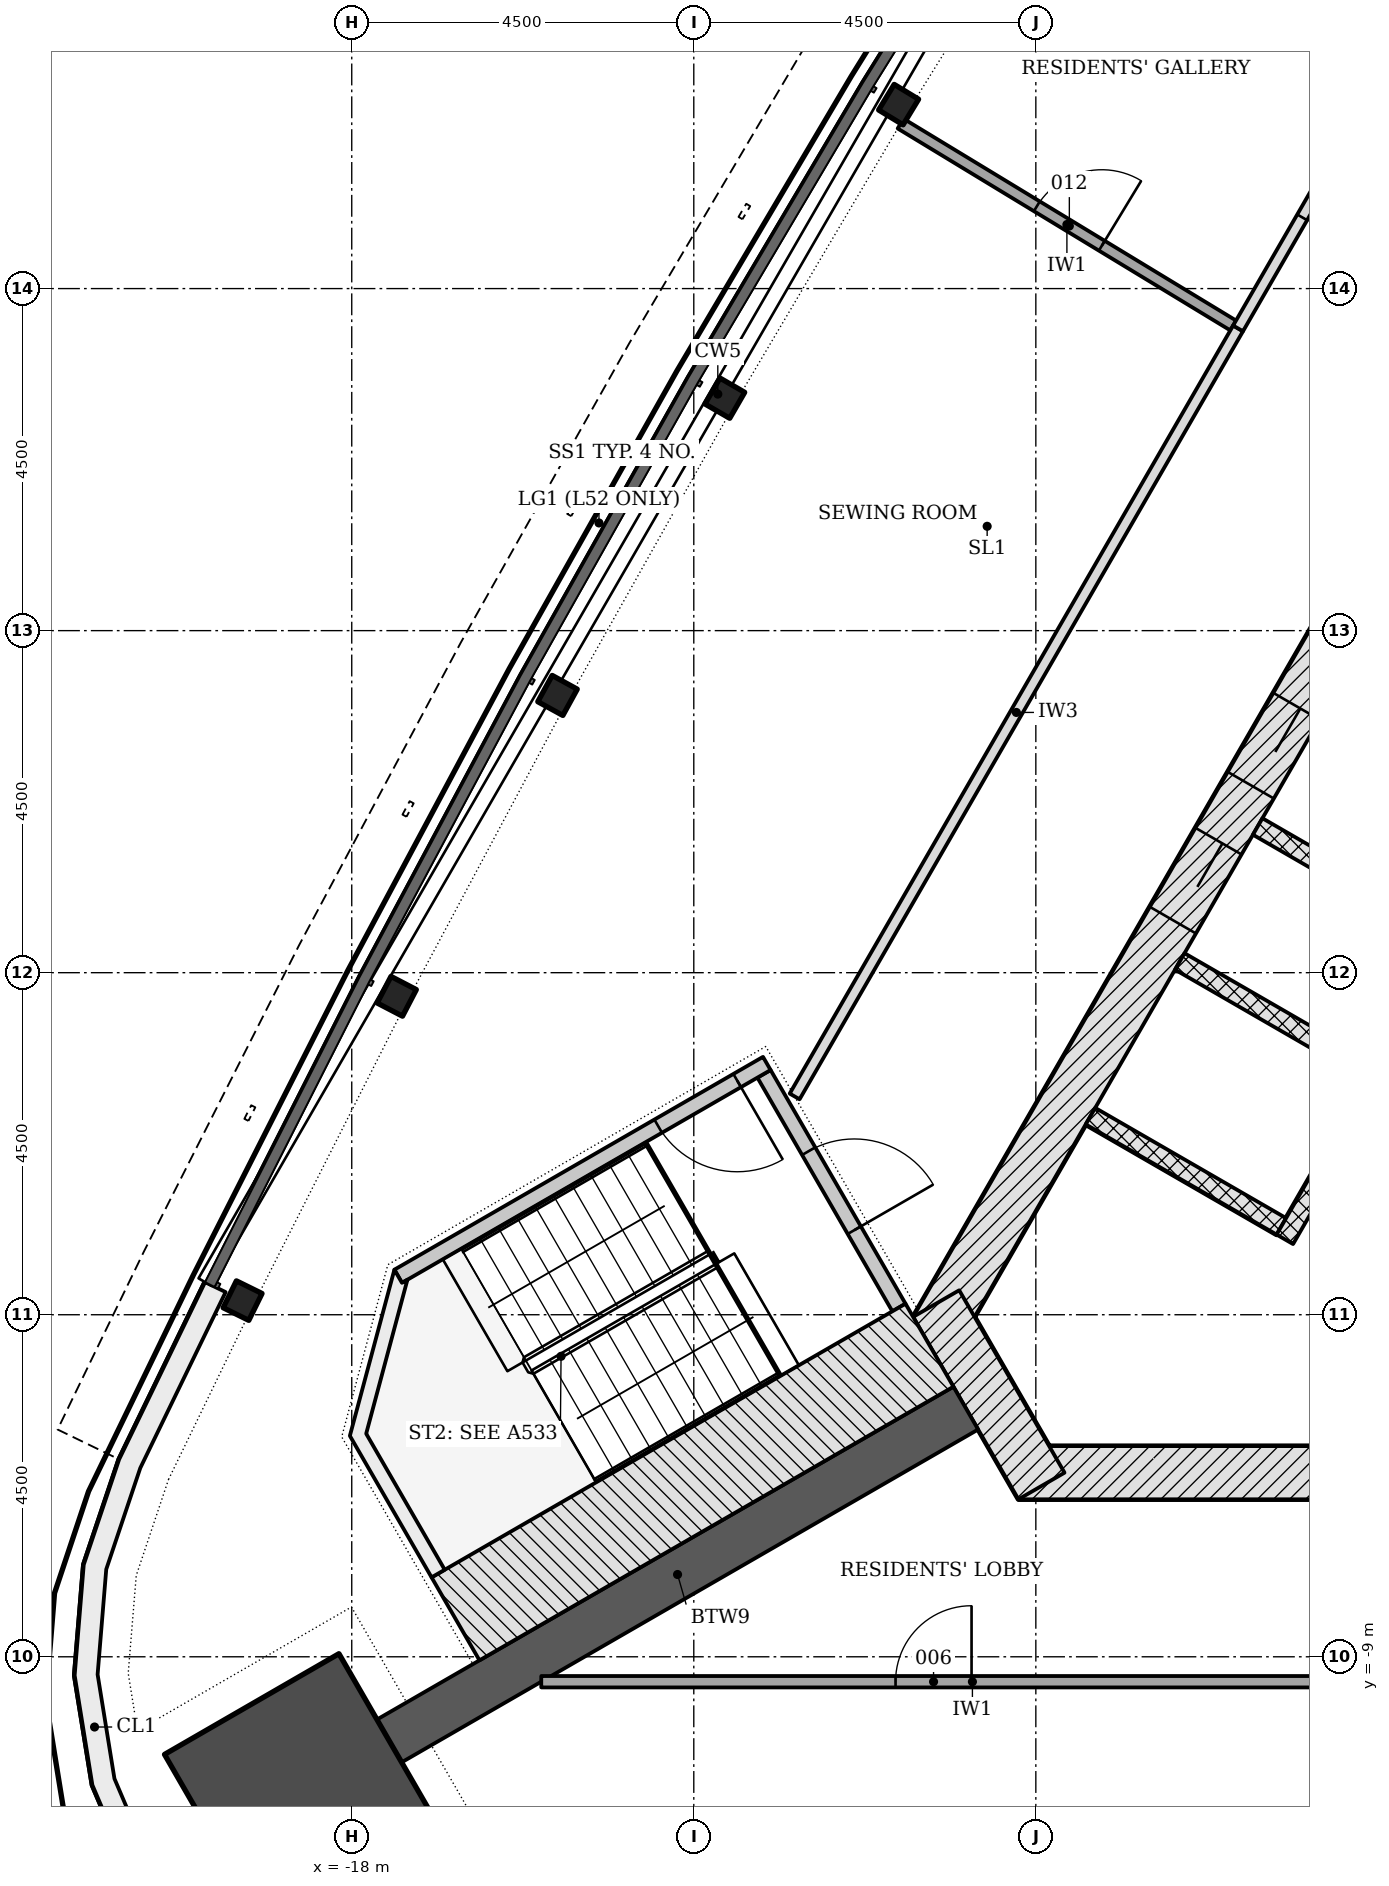
"""IFC4 building model, lengths in metres.
Left out: names, types, materials, properties, quantities, classifications, styles, units other than length and angle.
Written with IfcOpenShell. Run it as: python <this file> out.ifc"""

import sys

from ifc_helpers import new_model, si_unit, direction, frame, frame_2d, origin, origin_2d, place, context, subcontext, project, spatial, polyline, rectangle, i_section, outline, extrude, element, fill, save


model = new_model("IFC4")
c1 = context("Model", 3, precision=1e-05, world=origin(), true_north=direction((0.0, 1.0)))
c2 = subcontext(c1, "Body", "Model", "MODEL_VIEW")
j1 = project(units=[si_unit("LENGTHUNIT", "METRE"), si_unit("PLANEANGLEUNIT", "RADIAN")], contexts=[c1])
p1 = place(None, origin())
s1 = spatial("IfcSite", under=j1, at=p1, CompositionType="ELEMENT")
p2 = place(p1, origin())
s2 = spatial("IfcBuilding", under=s1, at=p2, CompositionType="ELEMENT")
p3 = place(p2, frame((0.0, 0.0, 203.1)))
s3 = spatial("IfcBuildingStorey", under=s2, at=p3, CompositionType="ELEMENT", Elevation=203.1)
p4 = place(p3, frame((-9.229, -6.578, -0.2), z_axis=(0.0, 0.0, 1.0), x_axis=(1.0, 0.0, 0.0)))
e1 = element("IfcWall", 1, at=p4, inside=s3, PredefinedType="SHEAR", context=c2, shape_type="SweptSolid", body=[
    extrude(rectangle(XDim=18.458, YDim=0.7, at=frame_2d((9.229, 0.0))), origin(), (0.0, 0.0, 1.0), 3.6),
])
p5 = place(p4, frame((8.7, 0.0, 0.2)))
e2 = element("IfcOpeningElement", 2, at=p5, cuts=e1, PredefinedType="OPENING", context=c2, shape_type="SweptSolid", body=[
    extrude(rectangle(XDim=1.0, YDim=2.1, at=frame_2d((0.5, 1.05))), frame((0.0, 0.36, 0.0), z_axis=(0.0, -1.0, 0.0), x_axis=(1.0, 0.0, 0.0)), (0.0, 0.0, 1.0), 0.72),
])
p6 = place(p4, frame((3.99, 0.0, 0.2)))
e3 = element("IfcOpeningElement", 3, at=p6, cuts=e1, PredefinedType="OPENING", context=c2, shape_type="SweptSolid", body=[
    extrude(rectangle(XDim=0.9, YDim=2.1, at=frame_2d((0.45, 1.05))), frame((0.0, 0.36, 0.0), z_axis=(0.0, -1.0, 0.0), x_axis=(1.0, 0.0, 0.0)), (0.0, 0.0, 1.0), 0.72),
])
p7 = place(p4, frame((13.489, 0.0, 0.2)))
e4 = element("IfcOpeningElement", 4, at=p7, cuts=e1, PredefinedType="OPENING", context=c2, shape_type="SweptSolid", body=[
    extrude(rectangle(XDim=1.0, YDim=2.1, at=frame_2d((0.5, 1.05))), frame((0.0, 0.36, 0.0), z_axis=(0.0, -1.0, 0.0), x_axis=(1.0, 0.0, 0.0)), (0.0, 0.0, 1.0), 0.72),
])
p8 = place(p3, frame((-1.083, 11.281, -0.2), z_axis=(0.0, 0.0, 1.0), x_axis=(-0.500001446645, -0.866024568562, 0.0)))
e5 = element("IfcWall", 5, at=p8, inside=s3, PredefinedType="SHEAR", context=c2, shape_type="SweptSolid", body=[
    extrude(rectangle(XDim=18.458, YDim=0.7, at=frame_2d((9.229, 0.0))), origin(), (0.0, 0.0, 1.0), 3.6),
])
p9 = place(p8, frame((8.979, 0.0, 0.2)))
e6 = element("IfcOpeningElement", 6, at=p9, cuts=e5, PredefinedType="OPENING", context=c2, shape_type="SweptSolid", body=[
    extrude(rectangle(XDim=1.2, YDim=2.1, at=frame_2d((0.6, 1.05))), frame((0.0, 0.36, 0.0), z_axis=(0.0, -1.0, 0.0), x_axis=(1.0, 0.0, 0.0)), (0.0, 0.0, 1.0), 0.72),
])
p10 = place(p8, frame((11.029, 0.0, 0.2)))
e7 = element("IfcOpeningElement", 7, at=p10, cuts=e5, PredefinedType="OPENING", context=c2, shape_type="SweptSolid", body=[
    extrude(rectangle(XDim=1.2, YDim=2.1, at=frame_2d((0.6, 1.05))), frame((0.0, 0.36, 0.0), z_axis=(0.0, -1.0, 0.0), x_axis=(1.0, 0.0, 0.0)), (0.0, 0.0, 1.0), 0.72),
])
p11 = place(p3, frame((-10.311, -4.353, -0.2), z_axis=(0.0, 0.0, 1.0), x_axis=(0.500042739161, -0.866000726912, 0.0)))
e8 = element("IfcWall", 8, at=p11, inside=s3, PredefinedType="SHEAR", context=c2, shape_type="SweptSolid", body=[
    extrude(rectangle(XDim=2.771, YDim=0.7, at=frame_2d((1.386, 0.0))), origin(), (0.0, 0.0, 1.0), 3.6),
])
p12 = place(p3, frame((-9.922, -5.728, -0.2), z_axis=(0.0, 0.0, 1.0), x_axis=(-0.866030064713, -0.499991926948, 0.0)))
e9 = element("IfcWall", 9, at=p12, inside=s3, PredefinedType="SHEAR", context=c2, shape_type="SweptSolid", body=[
    extrude(rectangle(XDim=8.758, YDim=0.65, at=frame_2d((4.379, 0.0))), origin(), (0.0, 0.0, 1.0), 3.6),
])
p13 = place(p3, frame((-18.653, -10.77, -0.2), z_axis=(0.0, 0.0, 1.0), x_axis=(-0.866025403784, -0.5, 0.0)))
e10 = element("IfcColumn", 10, at=p13, inside=s3, PredefinedType="COLUMN", context=c2, shape_type="SweptSolid", body=[
    extrude(rectangle(XDim=2.65, YDim=2.65, at=origin_2d()), origin(), (0.0, 0.0, 1.0), 3.6),
])
for number, where, z_axis, x_axis in (
    (11, (-10.805, 11.42, -0.2), (0.0, 0.0, 1.0), (-0.519, -0.855, 0.0)),
    (12, (-13.092, 7.558, -0.2), (0.0, 0.0, 1.0), (-0.5, -0.866, 0.0)),
    (13, (-15.293, 3.647, -0.2), (0.0, 0.0, 1.0), (-0.481, -0.877, 0.0)),
    (14, (-17.408, -0.311, -0.2), (0.0, 0.0, 1.0), (-0.462, -0.887, 0.0)),
    (15, (-19.436, -4.314, -0.2), (0.0, 0.0, 1.0), (-0.442, -0.897, 0.0)),
):
    element("IfcColumn", number, at=place(p3, frame(where, z_axis=z_axis, x_axis=x_axis)), inside=s3, PredefinedType="COLUMN", context=c2, shape_type="SweptSolid", body=[
        extrude(i_section(OverallWidth=0.394, OverallDepth=0.376, WebThickness=0.017, FlangeThickness=0.028, FilletRadius=0.015, at=origin_2d()), origin(), (0.0, 0.0, 1.0), 3.6),
    ])
p14 = place(p3, origin())
e16 = element("IfcWall", 16, at=p14, inside=s3, PredefinedType="NOTDEFINED", context=c2, shape_type="SweptSolid", body=[
    extrude(outline(polyline([(-19.929, -4.071), (-21.06, -6.403), (-21.526, -7.788), (-21.646, -9.245), (-21.412, -10.687), (-20.84, -12.032), (-19.961, -13.2), (-18.829, -14.123), (-17.508, -14.748), (-16.075, -15.037), (-13.49, -15.224), (-13.469, -14.925), (-16.034, -14.74), (-17.412, -14.461), (-18.667, -13.868), (-19.744, -12.99), (-20.578, -11.881), (-21.122, -10.603), (-21.344, -9.233), (-21.23, -7.849), (-20.782, -6.516), (-19.659, -4.202), (-19.929, -4.071)])), origin(), (0.0, 0.0, 1.0), 3.3),
])
for number, where, z_axis, x_axis in (
    (17, (-6.081, 1.923, -0.2), (0.0, 0.0, 1.0), (0.866, -0.5, 0.0)),
    (18, (-7.106, 0.148, -0.2), (0.0, 0.0, 1.0), (0.866, -0.5, 0.0)),
    (19, (-8.281, -1.887, -0.2), (0.0, 0.0, 1.0), (0.866, -0.5, 0.0)),
):
    element("IfcWall", number, at=place(p3, frame(where, z_axis=z_axis, x_axis=x_axis)), inside=s3, PredefinedType="PARTITIONING", context=c2, shape_type="SweptSolid", body=[
        extrude(rectangle(XDim=2.9, YDim=0.25, at=frame_2d((1.45, 0.0))), origin(), (0.0, 0.0, 1.0), 3.6),
    ])
p15 = place(p3, frame((-2.374, 2.294, 0.0), z_axis=(0.0, 0.0, 1.0), x_axis=(-0.500003174267, -0.866023571113, 0.0)))
e20 = element("IfcWall", 20, at=p15, inside=s3, PredefinedType="PARTITIONING", context=c2, shape_type="SweptSolid", body=[
    extrude(rectangle(XDim=6.7, YDim=0.25, at=frame_2d((3.35, 0.0))), origin(), (0.0, 0.0, 1.0), 3.4),
])
p16 = place(p3, frame((-12.576, -1.331, -0.2), z_axis=(0.0, 0.0, 1.0), x_axis=(0.499970499736, -0.8660424351, 0.0)))
e21 = element("IfcWall", 21, at=p16, inside=s3, PredefinedType="SHEAR", context=c2, shape_type="SweptSolid", body=[
    extrude(rectangle(XDim=3.55, YDim=0.2, at=frame_2d((1.775, 0.0))), origin(), (0.0, 0.0, 1.0), 3.6),
])
p17 = place(p16, frame((1.175, 0.0, 0.2)))
e22 = element("IfcOpeningElement", 22, at=p17, cuts=e21, PredefinedType="OPENING", context=c2, shape_type="SweptSolid", body=[
    extrude(rectangle(XDim=1.2, YDim=2.1, at=frame_2d((0.6, 1.05))), frame((0.0, 0.11, 0.0), z_axis=(0.0, -1.0, 0.0), x_axis=(1.0, 0.0, 0.0)), (0.0, 0.0, 1.0), 0.22),
])
p18 = place(p3, frame((-12.539, -1.194, -0.2), z_axis=(0.0, 0.0, 1.0), x_axis=(-0.866045472092, -0.499965239061, 0.0)))
e23 = element("IfcWall", 23, at=p18, inside=s3, PredefinedType="SHEAR", context=c2, shape_type="SweptSolid", body=[
    extrude(rectangle(XDim=5.6, YDim=0.2, at=frame_2d((2.8, 0.0))), origin(), (0.0, 0.0, 1.0), 3.6),
])
p19 = place(p18, frame((0.45, 0.0, 0.2)))
e24 = element("IfcOpeningElement", 24, at=p19, cuts=e23, PredefinedType="OPENING", context=c2, shape_type="SweptSolid", body=[
    extrude(rectangle(XDim=1.2, YDim=2.1, at=frame_2d((0.6, 1.05))), frame((0.0, 0.11, 0.0), z_axis=(0.0, -1.0, 0.0), x_axis=(1.0, 0.0, 0.0)), (0.0, 0.0, 1.0), 0.22),
])
p20 = place(p3, frame((-10.399, -4.901, -0.2), z_axis=(0.0, 0.0, 1.0), x_axis=(-0.866018442252, -0.500012057535, 0.0)))
e25 = element("IfcWall", 25, at=p20, inside=s3, PredefinedType="SHEAR", context=c2, shape_type="SweptSolid", body=[
    extrude(rectangle(XDim=7.2, YDim=1.261, at=frame_2d((3.6, 0.0))), origin(), (0.0, 0.0, 1.0), 3.6),
])
p21 = place(p3, frame((0.0, 0.0, -0.2)))
e26 = element("IfcWall", 26, at=p21, inside=s3, PredefinedType="SHEAR", context=c2, shape_type="SweptSolid", body=[
    extrude(outline(polyline([(-17.439, -3.907), (-18.025, -6.093), (-16.95, -7.955), (-16.777, -7.855), (-17.81, -6.065), (-17.267, -4.039), (-17.339, -4.081), (-17.339, -4.081), (-17.339, -4.081), (-17.339, -4.081), (-17.339, -4.081), (-17.339, -4.081), (-17.339, -4.081), (-17.339, -4.081), (-17.339, -4.081), (-17.339, -4.081), (-17.339, -4.081), (-17.339, -4.081), (-17.339, -4.081), (-17.339, -4.081), (-17.339, -4.081), (-17.339, -4.081), (-17.339, -4.081), (-17.439, -3.907)])), origin(), (0.0, 0.0, 1.0), 3.6),
])
p22 = place(p3, frame((-15.507, -9.328, 0.0), z_axis=(0.0, 0.0, 1.0), x_axis=(1.0, 0.0, 0.0)))
e27 = element("IfcWall", 27, at=p22, inside=s3, PredefinedType="PARTITIONING", context=c2, shape_type="SweptSolid", body=[
    extrude(rectangle(XDim=11.345, YDim=0.15, at=frame_2d((5.672, 0.0))), origin(), (0.0, 0.0, 1.0), 2.852),
])
p23 = place(p22, frame((4.661, 0.0, 0.0)))
e28 = element("IfcOpeningElement", 28, at=p23, cuts=e27, PredefinedType="OPENING", context=c2, shape_type="SweptSolid", body=[
    extrude(rectangle(XDim=1.0, YDim=2.1, at=frame_2d((0.5, 1.05))), frame((0.0, 0.085, 0.0), z_axis=(0.0, -1.0, 0.0), x_axis=(1.0, 0.0, 0.0)), (0.0, 0.0, 1.0), 0.17),
])
p24 = place(p3, frame((-6.34, 8.476, 0.0), z_axis=(0.0, 0.0, 1.0), x_axis=(-0.499987514004, -0.866032612458, 0.0)))
e29 = element("IfcWall", 29, at=p24, inside=s3, PredefinedType="PARTITIONING", context=c2, shape_type="SweptSolid", body=[
    extrude(rectangle(XDim=11.667, YDim=0.15, at=frame_2d((5.833, 0.0))), origin(), (0.0, 0.0, 1.0), 2.852),
])
p25 = place(p3, frame((-10.779, 11.17, 0.0), z_axis=(0.0, 0.0, 1.0), x_axis=(0.854884995592, -0.518817544337, 0.0)))
e30 = element("IfcWall", 30, at=p25, inside=s3, PredefinedType="PARTITIONING", context=c2, shape_type="SweptSolid", body=[
    extrude(rectangle(XDim=5.118, YDim=0.15, at=frame_2d((2.559, 0.0))), origin(), (0.0, 0.0, 1.0), 3.4),
])
p26 = place(p25, frame((2.096, 0.0, 0.0)))
e31 = element("IfcOpeningElement", 31, at=p26, cuts=e30, PredefinedType="OPENING", context=c2, shape_type="SweptSolid", body=[
    extrude(rectangle(XDim=1.0, YDim=2.1, at=frame_2d((0.5, 1.05))), frame((0.0, 0.085, 0.0), z_axis=(0.0, -1.0, 0.0), x_axis=(1.0, 0.0, 0.0)), (0.0, 0.0, 1.0), 0.17),
])
p27 = place(p3, frame((-4.152, 12.265, 0.0), z_axis=(0.0, 0.0, 1.0), x_axis=(-0.500028399337, -0.866009006799, 0.0)))
e32 = element("IfcWall", 32, at=p27, inside=s3, PredefinedType="PARTITIONING", context=c2, shape_type="SweptSolid", body=[
    extrude(rectangle(XDim=4.375, YDim=0.15, at=frame_2d((2.188, 0.0))), origin(), (0.0, 0.0, 1.0), 2.852),
])
p28 = place(p27, frame((1.687, 0.0, 0.0)))
e33 = element("IfcOpeningElement", 33, at=p28, cuts=e32, PredefinedType="OPENING", context=c2, shape_type="SweptSolid", body=[
    extrude(rectangle(XDim=1.0, YDim=2.1, at=frame_2d((0.5, 1.05))), frame((0.0, 0.085, 0.0), z_axis=(0.0, -1.0, 0.0), x_axis=(1.0, 0.0, 0.0)), (0.0, 0.0, 1.0), 0.17),
])
p29 = place(p9, origin())
e34 = element("IfcDoor", 34, at=p29, inside=s3, OperationType="DOUBLE_DOOR_SLIDING", PredefinedType="DOOR", context=c2, shape_type="SweptSolid", body=[
    extrude(rectangle(XDim=1.2, YDim=2.1, at=frame_2d((0.6, 1.05))), frame((0.0, 0.025, 0.0), z_axis=(0.0, -1.0, 0.0), x_axis=(1.0, 0.0, 0.0)), (0.0, 0.0, 1.0), 0.05),
])
fill(e6, e34)
p30 = place(p10, origin())
e35 = element("IfcDoor", 35, at=p30, inside=s3, OperationType="DOUBLE_DOOR_SLIDING", PredefinedType="DOOR", context=c2, shape_type="SweptSolid", body=[
    extrude(rectangle(XDim=1.2, YDim=2.1, at=frame_2d((0.6, 1.05))), frame((0.0, 0.025, 0.0), z_axis=(0.0, -1.0, 0.0), x_axis=(1.0, 0.0, 0.0)), (0.0, 0.0, 1.0), 0.05),
])
fill(e7, e35)
p31 = place(p17, origin())
e36 = element("IfcDoor", 36, at=p31, inside=s3, OperationType="SINGLE_SWING_RIGHT", PredefinedType="DOOR", context=c2, shape_type="SweptSolid", body=[
    extrude(rectangle(XDim=1.2, YDim=2.1, at=frame_2d((0.6, 1.05))), frame((0.0, 0.025, 0.0), z_axis=(0.0, -1.0, 0.0), x_axis=(1.0, 0.0, 0.0)), (0.0, 0.0, 1.0), 0.05),
])
fill(e22, e36)
p32 = place(p19, origin())
e37 = element("IfcDoor", 37, at=p32, inside=s3, OperationType="SINGLE_SWING_LEFT", PredefinedType="DOOR", context=c2, shape_type="SweptSolid", body=[
    extrude(rectangle(XDim=1.2, YDim=2.1, at=frame_2d((0.6, 1.05))), frame((0.0, 0.025, 0.0), z_axis=(0.0, -1.0, 0.0), x_axis=(1.0, 0.0, 0.0)), (0.0, 0.0, 1.0), 0.05),
])
fill(e24, e37)
p33 = place(p23, origin())
e38 = element("IfcDoor", 38, at=p33, inside=s3, OperationType="SINGLE_SWING_RIGHT", PredefinedType="DOOR", context=c2, shape_type="SweptSolid", body=[
    extrude(rectangle(XDim=1.0, YDim=2.1, at=frame_2d((0.5, 1.05))), frame((0.0, 0.025, 0.0), z_axis=(0.0, -1.0, 0.0), x_axis=(1.0, 0.0, 0.0)), (0.0, 0.0, 1.0), 0.05),
])
fill(e28, e38)
p34 = place(p28, origin())
e39 = element("IfcDoor", 39, at=p34, inside=s3, OperationType="SINGLE_SWING_LEFT", PredefinedType="DOOR", context=c2, shape_type="SweptSolid", body=[
    extrude(rectangle(XDim=1.0, YDim=2.1, at=frame_2d((0.5, 1.05))), frame((0.0, 0.025, 0.0), z_axis=(0.0, -1.0, 0.0), x_axis=(1.0, 0.0, 0.0)), (0.0, 0.0, 1.0), 0.05),
])
fill(e33, e39)
p35 = place(p26, origin())
e40 = element("IfcDoor", 40, at=p35, inside=s3, OperationType="SINGLE_SWING_RIGHT", PredefinedType="DOOR", context=c2, shape_type="SweptSolid", body=[
    extrude(rectangle(XDim=1.0, YDim=2.1, at=frame_2d((0.5, 1.05))), frame((0.0, 0.025, 0.0), z_axis=(0.0, -1.0, 0.0), x_axis=(1.0, 0.0, 0.0)), (0.0, 0.0, 1.0), 0.05),
])
fill(e31, e40)
save(model, sys.argv[1])
